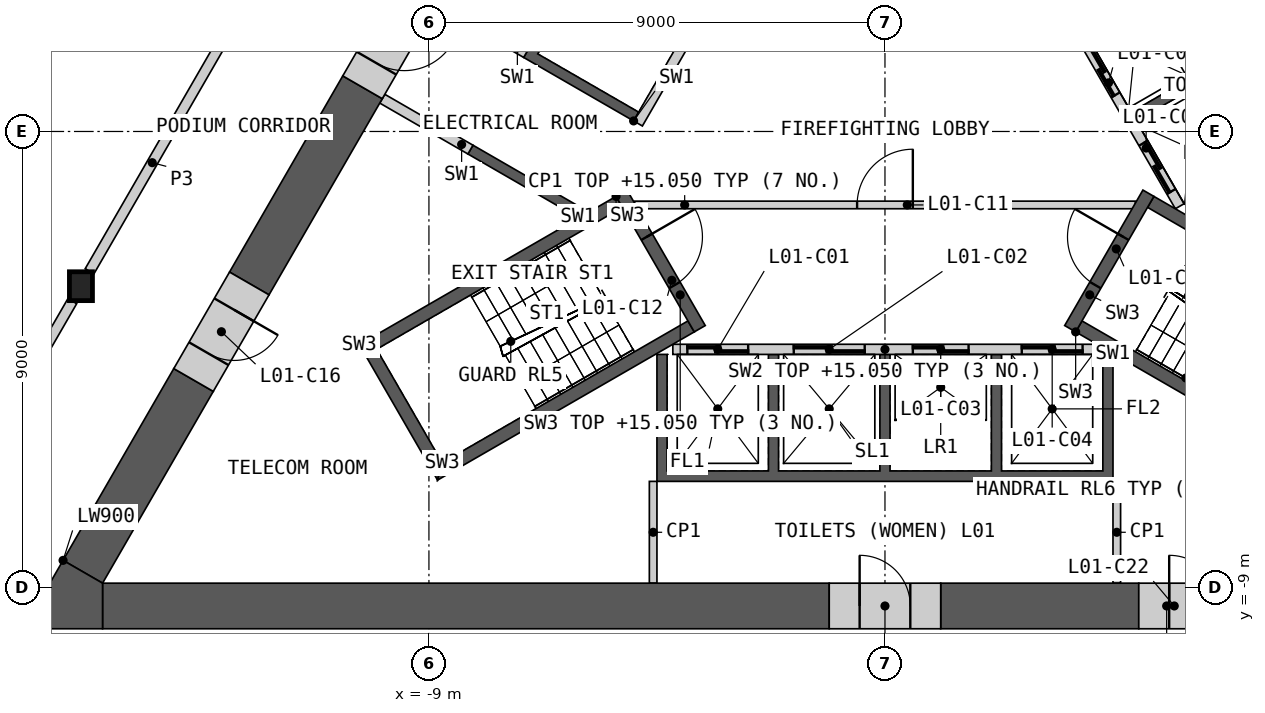
"""IFC4 building model, lengths in metres.
Left out: names, types, materials, properties, quantities, classifications, styles, units other than length and angle.
Written with IfcOpenShell. Run it as: python <this file> out.ifc"""

import sys

from ifc_helpers import new_model, si_unit, direction, frame, frame_2d, origin, origin_2d, place, context, subcontext, project, spatial, polyline, rectangle, i_section, outline, extrude, element, fill, save


model = new_model("IFC4")
c1 = context("Model", 3, precision=1e-05, world=origin(), true_north=direction((0.0, 1.0)))
c2 = subcontext(c1, "Body", "Model", "MODEL_VIEW")
j1 = project(units=[si_unit("LENGTHUNIT", "METRE"), si_unit("PLANEANGLEUNIT", "RADIAN")], contexts=[c1])
p1 = place(None, origin())
s1 = spatial("IfcSite", under=j1, at=p1, CompositionType="ELEMENT")
p2 = place(p1, origin())
s2 = spatial("IfcBuilding", under=s1, at=p2, CompositionType="ELEMENT")
p3 = place(p2, frame((0.0, 0.0, 10.0)))
s3 = spatial("IfcBuildingStorey", under=s2, at=p3, CompositionType="ELEMENT", Elevation=10.0)
p4 = place(p3, frame((-15.868, -3.054, 0.0), z_axis=(0.0, 0.0, 1.0), x_axis=(1.0, 0.0, 0.0)))
e1 = element("IfcColumn", 1, at=p4, inside=s3, PredefinedType="COLUMN", context=c2, shape_type="SweptSolid", body=[
    extrude(i_section(OverallWidth=0.454, OverallDepth=0.57, WebThickness=0.078, FlangeThickness=0.125, at=origin_2d()), origin(), (0.0, 0.0, 1.0), 5.5),
])
p5 = place(p3, origin())
e2 = element("IfcWall", 2, at=p5, inside=s3, PredefinedType="SHEAR", context=c2, shape_type="SweptSolid", body=[
    extrude(outline(polyline([(4.5, -4.4), (4.5, -6.906), (-4.5, -6.906), (-4.5, -4.4), (-4.3, -4.4), (-4.3, -6.7), (-2.3, -6.7), (-2.3, -4.4), (-2.1, -4.4), (-2.1, -6.7), (-0.1, -6.7), (-0.1, -4.4), (0.1, -4.4), (0.1, -6.7), (2.1, -6.7), (2.1, -4.4), (2.3, -4.4), (2.3, -6.7), (4.3, -6.7), (4.3, -4.4), (4.5, -4.4)])), origin(), (0.0, 0.0, 1.0), 5.05),
])
p6 = place(p3, frame((-4.187, -4.3, 0.0), z_axis=(0.0, 0.0, 1.0), x_axis=(1.0, 0.0, 0.0)))
e3 = element("IfcWall", 3, at=p6, inside=s3, PredefinedType="SOLIDWALL", context=c2, shape_type="SweptSolid", body=[
    extrude(rectangle(XDim=8.373, YDim=0.2, at=frame_2d((4.187, 0.0))), origin(), (0.0, 0.0, 1.0), 5.05),
])
p7 = place(p6, frame((0.287, 0.0, 0.0)))
e4 = element("IfcOpeningElement", 4, at=p7, cuts=e3, PredefinedType="OPENING", context=c2, shape_type="SweptSolid", body=[
    extrude(rectangle(XDim=1.2, YDim=2.1, at=frame_2d((0.6, 1.05))), frame((0.0, 0.11, 0.0), z_axis=(0.0, -1.0, 0.0), x_axis=(1.0, 0.0, 0.0)), (0.0, 0.0, 1.0), 0.22),
])
p8 = place(p6, frame((2.387, 0.0, 0.0)))
e5 = element("IfcOpeningElement", 5, at=p8, cuts=e3, PredefinedType="OPENING", context=c2, shape_type="SweptSolid", body=[
    extrude(rectangle(XDim=1.4, YDim=2.1, at=frame_2d((0.7, 1.05))), frame((0.0, 0.11, 0.0), z_axis=(0.0, -1.0, 0.0), x_axis=(1.0, 0.0, 0.0)), (0.0, 0.0, 1.0), 0.22),
])
p9 = place(p6, frame((4.737, 0.0, 0.0)))
e6 = element("IfcOpeningElement", 6, at=p9, cuts=e3, PredefinedType="OPENING", context=c2, shape_type="SweptSolid", body=[
    extrude(rectangle(XDim=1.1, YDim=2.1, at=frame_2d((0.55, 1.05))), frame((0.0, 0.11, 0.0), z_axis=(0.0, -1.0, 0.0), x_axis=(1.0, 0.0, 0.0)), (0.0, 0.0, 1.0), 0.22),
])
p10 = place(p6, frame((6.887, 0.0, 0.0)))
e7 = element("IfcOpeningElement", 7, at=p10, cuts=e3, PredefinedType="OPENING", context=c2, shape_type="SweptSolid", body=[
    extrude(rectangle(XDim=1.2, YDim=2.1, at=frame_2d((0.6, 1.05))), frame((0.0, 0.11, 0.0), z_axis=(0.0, -1.0, 0.0), x_axis=(1.0, 0.0, 0.0)), (0.0, 0.0, 1.0), 0.22),
])
p11 = place(p3, origin())
e8 = element("IfcWall", 8, at=p11, inside=s3, PredefinedType="SHEAR", context=c2, shape_type="SweptSolid", body=[
    extrude(outline(polyline([(2.66, 4.192), (4.831, 5.445), (8.231, -0.444), (6.061, -1.697), (5.96, -1.524), (7.952, -0.374), (6.952, 1.358), (4.96, 0.208), (4.861, 0.381), (6.852, 1.531), (5.852, 3.263), (3.861, 2.113), (3.76, 2.287), (5.752, 3.437), (4.752, 5.169), (2.76, 4.019), (2.66, 4.192)])), origin(), (0.0, 0.0, 1.0), 5.05),
])
p12 = place(p3, frame((5.817, -1.476, 0.0), z_axis=(0.0, 0.0, 1.0), x_axis=(-0.500002616675, 0.866023893041, 0.0)))
e9 = element("IfcWall", 9, at=p12, inside=s3, PredefinedType="SOLIDWALL", context=c2, shape_type="SweptSolid", body=[
    extrude(rectangle(XDim=8.373, YDim=0.2, at=frame_2d((4.187, 0.0))), origin(), (0.0, 0.0, 1.0), 5.05),
])
p13 = place(p12, frame((0.337, 0.0, 0.0)))
e10 = element("IfcOpeningElement", 10, at=p13, cuts=e9, PredefinedType="OPENING", context=c2, shape_type="SweptSolid", body=[
    extrude(rectangle(XDim=1.1, YDim=2.1, at=frame_2d((0.55, 1.05))), frame((0.0, 0.11, 0.0), z_axis=(0.0, -1.0, 0.0), x_axis=(1.0, 0.0, 0.0)), (0.0, 0.0, 1.0), 0.22),
])
p14 = place(p12, frame((2.537, 0.0, 0.0)))
e11 = element("IfcOpeningElement", 11, at=p14, cuts=e9, PredefinedType="OPENING", context=c2, shape_type="SweptSolid", body=[
    extrude(rectangle(XDim=1.1, YDim=2.1, at=frame_2d((0.55, 1.05))), frame((0.0, 0.11, 0.0), z_axis=(0.0, -1.0, 0.0), x_axis=(1.0, 0.0, 0.0)), (0.0, 0.0, 1.0), 0.22),
])
p15 = place(p12, frame((4.737, 0.0, 0.0)))
e12 = element("IfcOpeningElement", 12, at=p15, cuts=e9, PredefinedType="OPENING", context=c2, shape_type="SweptSolid", body=[
    extrude(rectangle(XDim=1.1, YDim=2.1, at=frame_2d((0.55, 1.05))), frame((0.0, 0.11, 0.0), z_axis=(0.0, -1.0, 0.0), x_axis=(1.0, 0.0, 0.0)), (0.0, 0.0, 1.0), 0.22),
])
p16 = place(p12, frame((7.037, 0.0, 0.0)))
e13 = element("IfcOpeningElement", 13, at=p16, cuts=e9, PredefinedType="OPENING", context=c2, shape_type="SweptSolid", body=[
    extrude(rectangle(XDim=0.9, YDim=2.1, at=frame_2d((0.45, 1.05))), frame((0.0, 0.11, 0.0), z_axis=(0.0, -1.0, 0.0), x_axis=(1.0, 0.0, 0.0)), (0.0, 0.0, 1.0), 0.22),
])
p17 = place(p3, origin())
e14 = element("IfcWall", 14, at=p17, inside=s3, PredefinedType="SHEAR", context=c2, shape_type="SweptSolid", body=[
    extrude(outline(polyline([(-6.061, -1.697), (-8.231, -0.444), (-8.131, -0.271), (-5.96, -1.524), (-6.061, -1.697)])), origin(), (0.0, 0.0, 1.0), 5.05),
])
p18 = place(p3, origin())
e15 = element("IfcWall", 15, at=p18, inside=s3, PredefinedType="SHEAR", context=c2, shape_type="SweptSolid", body=[
    extrude(outline(polyline([(-4.96, 0.208), (-7.131, 1.461), (-5.931, 3.54), (-3.76, 2.287), (-3.861, 2.113), (-5.852, 3.263), (-6.852, 1.531), (-4.861, 0.381), (-4.96, 0.208)])), origin(), (0.0, 0.0, 1.0), 5.05),
])
p19 = place(p3, frame((-1.631, 5.776, 0.0), z_axis=(0.0, 0.0, 1.0), x_axis=(-0.499992876559, -0.866029516466, 0.0)))
e16 = element("IfcWall", 16, at=p19, inside=s3, PredefinedType="SOLIDWALL", context=c2, shape_type="SweptSolid", body=[
    extrude(rectangle(XDim=6.486, YDim=0.2, at=frame_2d((3.243, 0.0))), origin(), (0.0, 0.0, 1.0), 5.05),
])
p20 = place(p19, frame((0.437, 0.0, 0.0)))
e17 = element("IfcOpeningElement", 17, at=p20, cuts=e16, PredefinedType="OPENING", context=c2, shape_type="SweptSolid", body=[
    extrude(rectangle(XDim=0.9, YDim=2.1, at=frame_2d((0.45, 1.05))), frame((0.0, 0.11, 0.0), z_axis=(0.0, -1.0, 0.0), x_axis=(1.0, 0.0, 0.0)), (0.0, 0.0, 1.0), 0.22),
])
p21 = place(p19, frame((2.637, 0.0, 0.0)))
e18 = element("IfcOpeningElement", 18, at=p21, cuts=e16, PredefinedType="OPENING", context=c2, shape_type="SweptSolid", body=[
    extrude(rectangle(XDim=0.9, YDim=2.1, at=frame_2d((0.45, 1.05))), frame((0.0, 0.11, 0.0), z_axis=(0.0, -1.0, 0.0), x_axis=(1.0, 0.0, 0.0)), (0.0, 0.0, 1.0), 0.22),
])
p22 = place(p3, frame((-7.081, 1.548, 0.0), z_axis=(0.0, 0.0, 1.0), x_axis=(-0.865983199114, 0.50007309351, 0.0)))
e19 = element("IfcWall", 19, at=p22, inside=s3, PredefinedType="SHEAR", context=c2, shape_type="SweptSolid", body=[
    extrude(rectangle(XDim=2.009, YDim=0.2, at=frame_2d((1.004, 0.0))), origin(), (0.0, 0.0, 1.0), 5.05),
])
p23 = place(p3, frame((-8.181, -0.357, 0.0), z_axis=(0.0, 0.0, 1.0), x_axis=(-0.866035824272, 0.499981950752, 0.0)))
e20 = element("IfcWall", 20, at=p23, inside=s3, PredefinedType="SHEAR", context=c2, shape_type="SweptSolid", body=[
    extrude(rectangle(XDim=2.009, YDim=0.2, at=frame_2d((1.004, 0.0))), origin(), (0.0, 0.0, 1.0), 5.05),
])
p24 = place(p3, frame((-4.941, -1.45, 0.0), z_axis=(0.0, 0.0, 1.0), x_axis=(1.0, 0.0, 0.0)))
e21 = element("IfcWall", 21, at=p24, inside=s3, PredefinedType="PARTITIONING", context=c2, shape_type="SweptSolid", body=[
    extrude(rectangle(XDim=9.882, YDim=0.15, at=frame_2d((4.941, 0.0))), origin(), (0.0, 0.0, 1.0), 5.05),
])
p25 = place(p24, frame((4.391, 0.0, 0.0)))
e22 = element("IfcOpeningElement", 22, at=p25, cuts=e21, PredefinedType="OPENING", context=c2, shape_type="SweptSolid", body=[
    extrude(rectangle(XDim=1.1, YDim=2.1, at=frame_2d((0.55, 1.05))), frame((0.0, 0.085, 0.0), z_axis=(0.0, -1.0, 0.0), x_axis=(1.0, 0.0, 0.0)), (0.0, 0.0, 1.0), 0.17),
])
p26 = place(p3, origin())
e23 = element("IfcWall", 23, at=p26, inside=s3, PredefinedType="SHEAR", context=c2, shape_type="SweptSolid", body=[
    extrude(outline(polyline([(-5.307, -1.281), (-10.374, -4.206), (-10.032, -4.298), (-5.182, -1.498), (-5.307, -1.281)])), origin(), (0.0, 0.0, 1.0), 5.05),
])
p27 = place(p3, origin())
e24 = element("IfcWall", 24, at=p27, inside=s3, PredefinedType="SHEAR", context=c2, shape_type="SweptSolid", body=[
    extrude(outline(polyline([(-10.374, -4.206), (-8.83, -6.881), (-8.738, -6.539), (-10.032, -4.298), (-10.374, -4.206)])), origin(), (0.0, 0.0, 1.0), 5.05),
])
p28 = place(p3, origin())
e25 = element("IfcWall", 25, at=p28, inside=s3, PredefinedType="SHEAR", context=c2, shape_type="SweptSolid", body=[
    extrude(outline(polyline([(-8.738, -6.539), (-8.83, -6.881), (-3.763, -3.956), (-3.888, -3.739), (-8.738, -6.539)])), origin(), (0.0, 0.0, 1.0), 5.05),
])
p29 = place(p3, frame((-5.199, -1.219, 0.0), z_axis=(0.0, 0.0, 1.0), x_axis=(0.499982516597, -0.866035497597, 0.0)))
e26 = element("IfcWall", 26, at=p29, inside=s3, PredefinedType="SHEAR", context=c2, shape_type="SweptSolid", body=[
    extrude(rectangle(XDim=3.088, YDim=0.25, at=frame_2d((1.544, 0.0))), origin(), (0.0, 0.0, 1.0), 5.05),
])
p30 = place(p29, frame((0.994, 0.0, 0.0)))
e27 = element("IfcOpeningElement", 27, at=p30, cuts=e26, PredefinedType="OPENING", context=c2, shape_type="SweptSolid", body=[
    extrude(rectangle(XDim=1.1, YDim=2.1, at=frame_2d((0.55, 1.05))), frame((0.0, 0.135, 0.0), z_axis=(0.0, -1.0, 0.0), x_axis=(1.0, 0.0, 0.0)), (0.0, 0.0, 1.0), 0.27),
])
p31 = place(p3, origin())
e28 = element("IfcWall", 28, at=p31, inside=s3, PredefinedType="SHEAR", context=c2, shape_type="SweptSolid", body=[
    extrude(outline(polyline([(3.763, -3.956), (8.83, -6.881), (8.738, -6.539), (3.888, -3.739), (3.763, -3.956)])), origin(), (0.0, 0.0, 1.0), 5.05),
])
p32 = place(p3, origin())
e29 = element("IfcWall", 29, at=p32, inside=s3, PredefinedType="SHEAR", context=c2, shape_type="SweptSolid", body=[
    extrude(outline(polyline([(10.032, -4.298), (10.374, -4.206), (5.307, -1.281), (5.182, -1.498), (10.032, -4.298)])), origin(), (0.0, 0.0, 1.0), 5.05),
])
p33 = place(p3, frame((3.655, -3.893, 0.0), z_axis=(0.0, 0.0, 1.0), x_axis=(0.499982516597, 0.866035497597, 0.0)))
e30 = element("IfcWall", 30, at=p33, inside=s3, PredefinedType="SHEAR", context=c2, shape_type="SweptSolid", body=[
    extrude(rectangle(XDim=3.088, YDim=0.25, at=frame_2d((1.544, 0.0))), origin(), (0.0, 0.0, 1.0), 5.05),
])
p34 = place(p33, frame((0.994, 0.0, 0.0)))
e31 = element("IfcOpeningElement", 31, at=p34, cuts=e30, PredefinedType="OPENING", context=c2, shape_type="SweptSolid", body=[
    extrude(rectangle(XDim=1.1, YDim=2.1, at=frame_2d((0.55, 1.05))), frame((0.0, 0.135, 0.0), z_axis=(0.0, -1.0, 0.0), x_axis=(1.0, 0.0, 0.0)), (0.0, 0.0, 1.0), 0.27),
])
for number, where, z_axis, x_axis in (
    (32, (4.575, -6.906, 0.0), (0.0, 0.0, 1.0), (0.0, -1.0, 0.0)),
    (33, (-4.575, -6.906, 0.0), (0.0, 0.0, 1.0), (0.0, -1.0, 0.0)),
):
    element("IfcWall", number, at=place(p3, frame(where, z_axis=z_axis, x_axis=x_axis)), inside=s3, PredefinedType="PARTITIONING", context=c2, shape_type="SweptSolid", body=[
        extrude(rectangle(XDim=2.009, YDim=0.15, at=frame_2d((1.004, 0.0))), origin(), (0.0, 0.0, 1.0), 5.05),
    ])
p35 = place(p3, frame((-15.441, -9.365, 0.0), z_axis=(0.0, 0.0, 1.0), x_axis=(1.0, 0.0, 0.0)))
e34 = element("IfcWall", 34, at=p35, inside=s3, PredefinedType="SHEAR", context=c2, shape_type="SweptSolid", body=[
    extrude(rectangle(XDim=14.341, YDim=0.9, at=frame_2d((7.17, 0.0))), origin(), (0.0, 0.0, 1.0), 5.05),
])
p36 = place(p3, frame((1.1, -9.365, 0.0), z_axis=(0.0, 0.0, 1.0), x_axis=(1.0, 0.0, 0.0)))
e35 = element("IfcWall", 35, at=p36, inside=s3, PredefinedType="SHEAR", context=c2, shape_type="SweptSolid", body=[
    extrude(rectangle(XDim=3.909, YDim=0.9, at=frame_2d((1.955, 0.0))), origin(), (0.0, 0.0, 1.0), 5.05),
])
p37 = place(p3, frame((-10.31, 0.872, 0.0), z_axis=(0.0, 0.0, 1.0), x_axis=(-0.499991893987, -0.866030083742, 0.0)))
e36 = element("IfcWall", 36, at=p37, inside=s3, PredefinedType="SHEAR", context=c2, shape_type="SweptSolid", body=[
    extrude(rectangle(XDim=4.471, YDim=0.9, at=frame_2d((2.235, 0.0))), origin(), (0.0, 0.0, 1.0), 5.05),
])
p38 = place(p3, frame((-13.646, -4.905, 0.0), z_axis=(0.0, 0.0, 1.0), x_axis=(-0.499990005186, -0.866031174216, 0.0)))
e37 = element("IfcWall", 37, at=p38, inside=s3, PredefinedType="SHEAR", context=c2, shape_type="SweptSolid", body=[
    extrude(rectangle(XDim=4.371, YDim=0.9, at=frame_2d((2.185, 0.0))), origin(), (0.0, 0.0, 1.0), 5.05),
])
p39 = place(p3, origin())
e38 = element("IfcWall", 38, at=p39, inside=s3, PredefinedType="SHEAR", context=c2, shape_type="SweptSolid", body=[
    extrude(outline(polyline([(-16.221, -8.465), (-15.441, -8.915), (-15.441, -9.815), (-17.0, -9.815), (-16.221, -8.465)])), origin(), (0.0, 0.0, 1.0), 5.05),
])
p40 = place(p3, frame((-1.1, -9.365, 0.0), z_axis=(0.0, 0.0, 1.0), x_axis=(1.0, 0.0, 0.0)))
e39 = element("IfcWall", 39, at=p40, inside=s3, PredefinedType="SHEAR", context=c2, shape_type="SweptSolid", body=[
    extrude(rectangle(XDim=2.2, YDim=0.9, at=frame_2d((1.1, 0.0))), origin(), (0.0, 0.0, 1.0), 5.05),
])
p41 = place(p40, frame((0.6, 0.0, 0.0)))
e40 = element("IfcOpeningElement", 40, at=p41, cuts=e39, PredefinedType="OPENING", context=c2, shape_type="SweptSolid", body=[
    extrude(rectangle(XDim=1.0, YDim=2.1, at=frame_2d((0.5, 1.05))), frame((0.0, 0.46, 0.0), z_axis=(0.0, -1.0, 0.0), x_axis=(1.0, 0.0, 0.0)), (0.0, 0.0, 1.0), 0.92),
])
p42 = place(p3, frame((-12.546, -3.0, 0.0), z_axis=(0.0, 0.0, 1.0), x_axis=(-0.499994660107, -0.866028486751, 0.0)))
e41 = element("IfcWall", 41, at=p42, inside=s3, PredefinedType="SHEAR", context=c2, shape_type="SweptSolid", body=[
    extrude(rectangle(XDim=2.2, YDim=0.9, at=frame_2d((1.1, 0.0))), origin(), (0.0, 0.0, 1.0), 5.05),
])
p43 = place(p42, frame((0.6, 0.0, 0.0)))
e42 = element("IfcOpeningElement", 42, at=p43, cuts=e41, PredefinedType="OPENING", context=c2, shape_type="SweptSolid", body=[
    extrude(rectangle(XDim=1.0, YDim=2.1, at=frame_2d((0.5, 1.05))), frame((0.0, 0.46, 0.0), z_axis=(0.0, -1.0, 0.0), x_axis=(1.0, 0.0, 0.0)), (0.0, 0.0, 1.0), 0.92),
])
p44 = place(p3, frame((5.009, -9.365, 0.0), z_axis=(0.0, 0.0, 1.0), x_axis=(1.0, 0.0, 0.0)))
e43 = element("IfcWall", 43, at=p44, inside=s3, PredefinedType="SHEAR", context=c2, shape_type="SweptSolid", body=[
    extrude(rectangle(XDim=2.2, YDim=0.9, at=frame_2d((1.1, 0.0))), origin(), (0.0, 0.0, 1.0), 5.05),
])
p45 = place(p44, frame((0.6, 0.0, 0.0)))
e44 = element("IfcOpeningElement", 44, at=p45, cuts=e43, PredefinedType="OPENING", context=c2, shape_type="SweptSolid", body=[
    extrude(rectangle(XDim=1.0, YDim=2.1, at=frame_2d((0.5, 1.05))), frame((0.0, 0.46, 0.0), z_axis=(0.0, -1.0, 0.0), x_axis=(1.0, 0.0, 0.0)), (0.0, 0.0, 1.0), 0.92),
])
p46 = place(p3, frame((-9.21, 2.777, 0.0), z_axis=(0.0, 0.0, 1.0), x_axis=(-0.500077893725, -0.86598042715, 0.0)))
e45 = element("IfcWall", 45, at=p46, inside=s3, PredefinedType="SHEAR", context=c2, shape_type="SweptSolid", body=[
    extrude(rectangle(XDim=2.2, YDim=0.9, at=frame_2d((1.1, 0.0))), origin(), (0.0, 0.0, 1.0), 5.05),
])
p47 = place(p46, frame((0.55, 0.0, 0.0)))
e46 = element("IfcOpeningElement", 46, at=p47, cuts=e45, PredefinedType="OPENING", context=c2, shape_type="SweptSolid", body=[
    extrude(rectangle(XDim=1.1, YDim=2.1, at=frame_2d((0.55, 1.05))), frame((0.0, 0.46, 0.0), z_axis=(0.0, -1.0, 0.0), x_axis=(1.0, 0.0, 0.0)), (0.0, 0.0, 1.0), 0.92),
])
p48 = place(p3, frame((-15.698, -2.759, 0.0), z_axis=(0.0, 0.0, 1.0), x_axis=(0.500004292778, 0.866022925334, 0.0)))
e47 = element("IfcWall", 47, at=p48, inside=s3, PredefinedType="PARTITIONING", context=c2, shape_type="SweptSolid", body=[
    extrude(rectangle(XDim=9.898, YDim=0.2, at=frame_2d((4.949, 0.0))), origin(), (0.0, 0.0, 1.0), 5.05),
])
p49 = place(p3, frame((-19.244, -8.902, 0.0), z_axis=(0.0, 0.0, 1.0), x_axis=(0.499988314375, 0.866032150378, 0.0)))
e48 = element("IfcWall", 48, at=p49, inside=s3, PredefinedType="PARTITIONING", context=c2, shape_type="SweptSolid", body=[
    extrude(rectangle(XDim=6.412, YDim=0.2, at=frame_2d((3.206, 0.0))), origin(), (0.0, 0.0, 1.0), 5.05),
])
p50 = place(p49, frame((2.356, 0.0, 0.0)))
e49 = element("IfcOpeningElement", 49, at=p50, cuts=e48, PredefinedType="OPENING", context=c2, shape_type="SweptSolid", body=[
    extrude(rectangle(XDim=1.8, YDim=2.1, at=frame_2d((0.9, 1.05))), frame((0.0, 0.11, 0.0), z_axis=(0.0, -1.0, 0.0), x_axis=(1.0, 0.0, 0.0)), (0.0, 0.0, 1.0), 0.22),
])
p51 = place(p7, origin())
e50 = element("IfcDoor", 50, at=p51, inside=s3, OperationType="SLIDING_TO_LEFT", PredefinedType="DOOR", context=c2, shape_type="SweptSolid", body=[
    extrude(rectangle(XDim=1.2, YDim=2.1, at=frame_2d((0.6, 1.05))), frame((0.0, 0.025, 0.0), z_axis=(0.0, -1.0, 0.0), x_axis=(1.0, 0.0, 0.0)), (0.0, 0.0, 1.0), 0.05),
])
fill(e4, e50)
p52 = place(p8, origin())
e51 = element("IfcDoor", 51, at=p52, inside=s3, OperationType="SLIDING_TO_LEFT", PredefinedType="DOOR", context=c2, shape_type="SweptSolid", body=[
    extrude(rectangle(XDim=1.4, YDim=2.1, at=frame_2d((0.7, 1.05))), frame((0.0, 0.025, 0.0), z_axis=(0.0, -1.0, 0.0), x_axis=(1.0, 0.0, 0.0)), (0.0, 0.0, 1.0), 0.05),
])
fill(e5, e51)
p53 = place(p9, origin())
e52 = element("IfcDoor", 52, at=p53, inside=s3, OperationType="SLIDING_TO_LEFT", PredefinedType="DOOR", context=c2, shape_type="SweptSolid", body=[
    extrude(rectangle(XDim=1.1, YDim=2.1, at=frame_2d((0.55, 1.05))), frame((0.0, 0.025, 0.0), z_axis=(0.0, -1.0, 0.0), x_axis=(1.0, 0.0, 0.0)), (0.0, 0.0, 1.0), 0.05),
])
fill(e6, e52)
p54 = place(p10, origin())
e53 = element("IfcDoor", 53, at=p54, inside=s3, OperationType="SLIDING_TO_LEFT", PredefinedType="DOOR", context=c2, shape_type="SweptSolid", body=[
    extrude(rectangle(XDim=1.2, YDim=2.1, at=frame_2d((0.6, 1.05))), frame((0.0, 0.025, 0.0), z_axis=(0.0, -1.0, 0.0), x_axis=(1.0, 0.0, 0.0)), (0.0, 0.0, 1.0), 0.05),
])
fill(e7, e53)
p55 = place(p13, origin())
e54 = element("IfcDoor", 54, at=p55, inside=s3, OperationType="SLIDING_TO_LEFT", PredefinedType="DOOR", context=c2, shape_type="SweptSolid", body=[
    extrude(rectangle(XDim=1.1, YDim=2.1, at=frame_2d((0.55, 1.05))), frame((0.0, 0.025, 0.0), z_axis=(0.0, -1.0, 0.0), x_axis=(1.0, 0.0, 0.0)), (0.0, 0.0, 1.0), 0.05),
])
fill(e10, e54)
p56 = place(p14, origin())
e55 = element("IfcDoor", 55, at=p56, inside=s3, OperationType="SLIDING_TO_LEFT", PredefinedType="DOOR", context=c2, shape_type="SweptSolid", body=[
    extrude(rectangle(XDim=1.1, YDim=2.1, at=frame_2d((0.55, 1.05))), frame((0.0, 0.025, 0.0), z_axis=(0.0, -1.0, 0.0), x_axis=(1.0, 0.0, 0.0)), (0.0, 0.0, 1.0), 0.05),
])
fill(e11, e55)
p57 = place(p25, origin())
e56 = element("IfcDoor", 56, at=p57, inside=s3, OperationType="SINGLE_SWING_RIGHT", PredefinedType="DOOR", context=c2, shape_type="SweptSolid", body=[
    extrude(rectangle(XDim=1.1, YDim=2.1, at=frame_2d((0.55, 1.05))), frame((0.0, 0.025, 0.0), z_axis=(0.0, -1.0, 0.0), x_axis=(1.0, 0.0, 0.0)), (0.0, 0.0, 1.0), 0.05),
])
fill(e22, e56)
p58 = place(p30, origin())
e57 = element("IfcDoor", 57, at=p58, inside=s3, OperationType="SINGLE_SWING_LEFT", PredefinedType="DOOR", context=c2, shape_type="SweptSolid", body=[
    extrude(rectangle(XDim=1.1, YDim=2.1, at=frame_2d((0.55, 1.05))), frame((0.0, 0.025, 0.0), z_axis=(0.0, -1.0, 0.0), x_axis=(1.0, 0.0, 0.0)), (0.0, 0.0, 1.0), 0.05),
])
fill(e27, e57)
p59 = place(p34, origin())
e58 = element("IfcDoor", 58, at=p59, inside=s3, OperationType="SINGLE_SWING_RIGHT", PredefinedType="DOOR", context=c2, shape_type="SweptSolid", body=[
    extrude(rectangle(XDim=1.1, YDim=2.1, at=frame_2d((0.55, 1.05))), frame((0.0, 0.025, 0.0), z_axis=(0.0, -1.0, 0.0), x_axis=(1.0, 0.0, 0.0)), (0.0, 0.0, 1.0), 0.05),
])
fill(e31, e58)
p60 = place(p41, origin())
e59 = element("IfcDoor", 59, at=p60, inside=s3, OperationType="SINGLE_SWING_LEFT", PredefinedType="DOOR", context=c2, shape_type="SweptSolid", body=[
    extrude(rectangle(XDim=1.0, YDim=2.1, at=frame_2d((0.5, 1.05))), frame((0.0, 0.205, 0.0), z_axis=(0.0, -1.0, 0.0), x_axis=(1.0, 0.0, 0.0)), (0.0, 0.0, 1.0), 0.05),
])
fill(e40, e59)
p61 = place(p43, origin())
e60 = element("IfcDoor", 60, at=p61, inside=s3, OperationType="SINGLE_SWING_LEFT", PredefinedType="DOOR", context=c2, shape_type="SweptSolid", body=[
    extrude(rectangle(XDim=1.0, YDim=2.1, at=frame_2d((0.5, 1.05))), frame((0.0, 0.205, 0.0), z_axis=(0.0, -1.0, 0.0), x_axis=(1.0, 0.0, 0.0)), (0.0, 0.0, 1.0), 0.05),
])
fill(e42, e60)
p62 = place(p45, origin())
e61 = element("IfcDoor", 61, at=p62, inside=s3, OperationType="SINGLE_SWING_LEFT", PredefinedType="DOOR", context=c2, shape_type="SweptSolid", body=[
    extrude(rectangle(XDim=1.0, YDim=2.1, at=frame_2d((0.5, 1.05))), frame((0.0, 0.205, 0.0), z_axis=(0.0, -1.0, 0.0), x_axis=(1.0, 0.0, 0.0)), (0.0, 0.0, 1.0), 0.05),
])
fill(e44, e61)
p63 = place(p47, origin())
e62 = element("IfcDoor", 62, at=p63, inside=s3, OperationType="SINGLE_SWING_LEFT", PredefinedType="DOOR", context=c2, shape_type="SweptSolid", body=[
    extrude(rectangle(XDim=1.1, YDim=2.1, at=frame_2d((0.55, 1.05))), frame((0.0, 0.205, 0.0), z_axis=(0.0, -1.0, 0.0), x_axis=(1.0, 0.0, 0.0)), (0.0, 0.0, 1.0), 0.05),
])
fill(e46, e62)
save(model, sys.argv[1])
